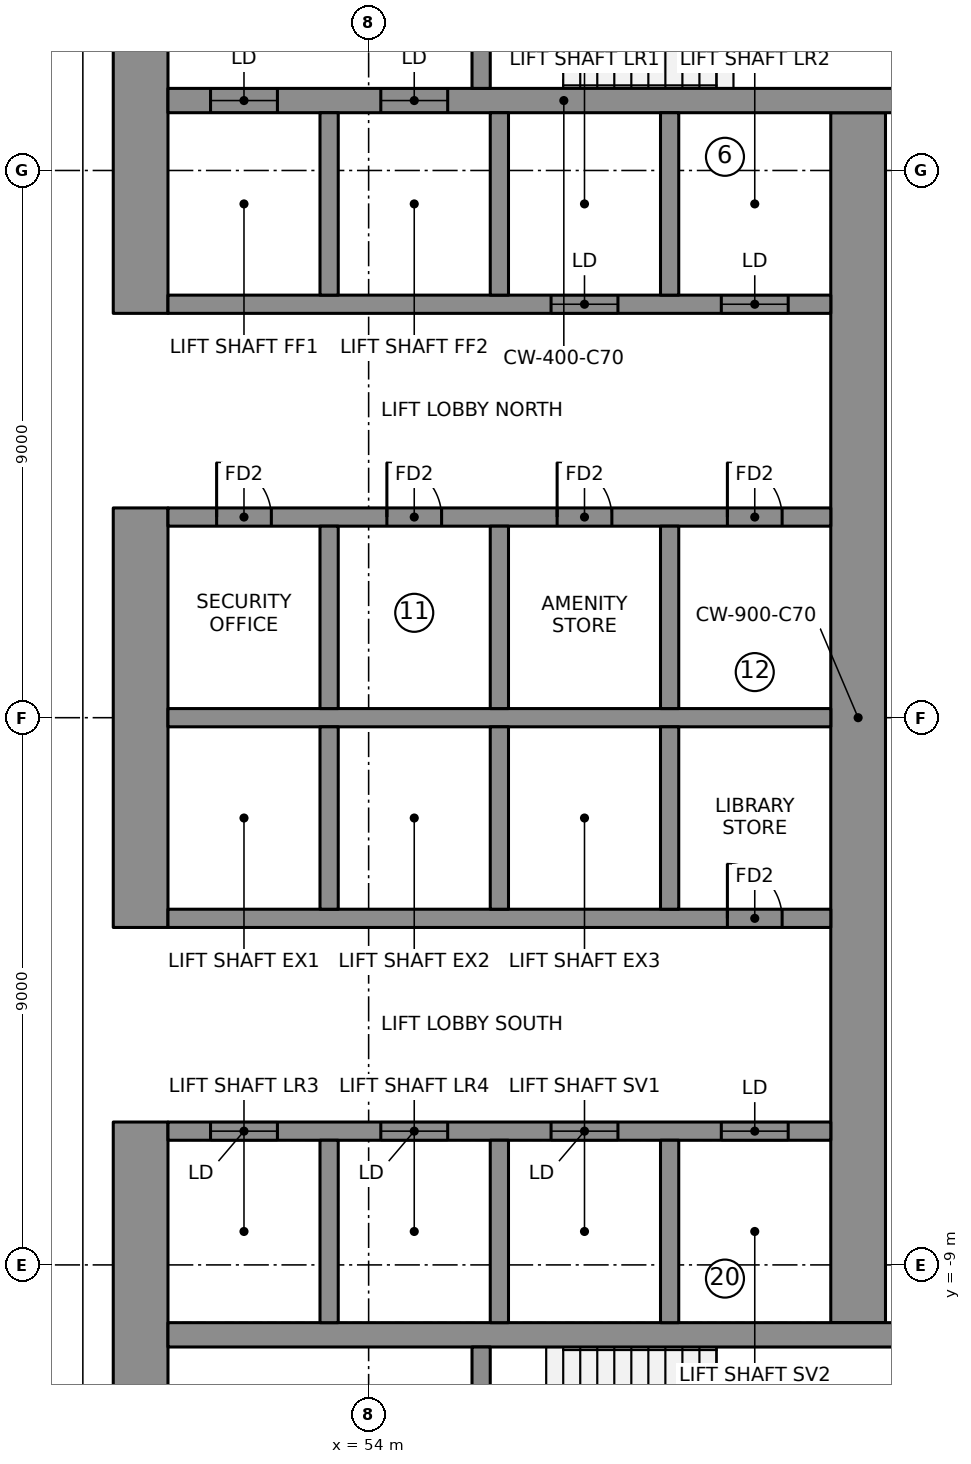
"""IFC4 building model, lengths in metres.
Left out: names, types, materials, properties, quantities, classifications, styles, units other than length and angle.
Written with IfcOpenShell. Run it as: python <this file> out.ifc"""

import sys

from ifc_helpers import new_model, si_unit, direction, frame, frame_2d, origin, place, context, subcontext, project, spatial, rectangle, extrude, element, fill, save


model = new_model("IFC4")
c1 = context("Model", 3, precision=1e-05, world=origin(), true_north=direction((0.0, 1.0)))
c2 = subcontext(c1, "Body", "Model", "MODEL_VIEW")
j1 = project(units=[si_unit("LENGTHUNIT", "METRE"), si_unit("PLANEANGLEUNIT", "RADIAN")], contexts=[c1])
p1 = place(None, origin())
s1 = spatial("IfcSite", under=j1, at=p1, CompositionType="ELEMENT")
p2 = place(p1, origin())
s2 = spatial("IfcBuilding", under=s1, at=p2, CompositionType="ELEMENT")
p3 = place(p2, frame((0.0, 0.0, 144.4)))
s3 = spatial("IfcBuildingStorey", under=s2, at=p3, CompositionType="ELEMENT", Elevation=144.4)
p4 = place(p3, frame((50.25, 6.65, 0.0), z_axis=(0.0, 0.0, 1.0), x_axis=(0.0, 1.0, 0.0)))
e1 = element("IfcWall", 1, at=p4, inside=s3, PredefinedType="SHEAR", context=c2, shape_type="SweptSolid", body=[
    extrude(rectangle(XDim=10.0, YDim=0.9, at=frame_2d((5.0, 0.0))), origin(), (0.0, 0.0, 1.0), 3.55),
])
p5 = place(p4, frame((6.5, 0.0, 0.0)))
e2 = element("IfcOpeningElement", 2, at=p5, cuts=e1, PredefinedType="OPENING", context=c2, shape_type="SweptSolid", body=[
    extrude(rectangle(XDim=1.1, YDim=2.1, at=frame_2d((0.55, 1.05))), frame((0.0, 0.46, 0.0), z_axis=(0.0, -1.0, 0.0), x_axis=(1.0, 0.0, 0.0)), (0.0, 0.0, 1.0), 0.92),
])
p6 = place(p3, frame((50.25, -3.45, 0.0), z_axis=(0.0, 0.0, 1.0), x_axis=(0.0, 1.0, 0.0)))
e3 = element("IfcWall", 3, at=p6, inside=s3, PredefinedType="SHEAR", context=c2, shape_type="SweptSolid", body=[
    extrude(rectangle(XDim=6.9, YDim=0.9, at=frame_2d((3.45, 0.0))), origin(), (0.0, 0.0, 1.0), 3.55),
])
p7 = place(p3, frame((50.25, -16.65, 0.0), z_axis=(0.0, 0.0, 1.0), x_axis=(0.0, 1.0, 0.0)))
e4 = element("IfcWall", 4, at=p7, inside=s3, PredefinedType="SHEAR", context=c2, shape_type="SweptSolid", body=[
    extrude(rectangle(XDim=10.0, YDim=0.9, at=frame_2d((5.0, 0.0))), origin(), (0.0, 0.0, 1.0), 3.55),
])
p8 = place(p7, frame((2.4, 0.0, 0.0)))
e5 = element("IfcOpeningElement", 5, at=p8, cuts=e4, PredefinedType="OPENING", context=c2, shape_type="SweptSolid", body=[
    extrude(rectangle(XDim=1.1, YDim=2.1, at=frame_2d((0.55, 1.05))), frame((0.0, 0.46, 0.0), z_axis=(0.0, -1.0, 0.0), x_axis=(1.0, 0.0, 0.0)), (0.0, 0.0, 1.0), 0.92),
])
p9 = place(p3, frame((62.05, -9.95, 0.0), z_axis=(0.0, 0.0, 1.0), x_axis=(0.0, 1.0, 0.0)))
e6 = element("IfcWall", 6, at=p9, inside=s3, PredefinedType="SHEAR", context=c2, shape_type="SweptSolid", body=[
    extrude(rectangle(XDim=19.9, YDim=0.9, at=frame_2d((9.95, 0.0))), origin(), (0.0, 0.0, 1.0), 3.55),
])
p10 = place(p3, frame((50.7, 10.15, 0.0), z_axis=(0.0, 0.0, 1.0), x_axis=(1.0, 0.0, 0.0)))
e7 = element("IfcWall", 7, at=p10, inside=s3, PredefinedType="SHEAR", context=c2, shape_type="SweptSolid", body=[
    extrude(rectangle(XDim=13.02, YDim=0.4, at=frame_2d((6.51, 0.0))), origin(), (0.0, 0.0, 1.0), 3.55),
])
p11 = place(p10, frame((0.7, 0.0, 0.0)))
e8 = element("IfcOpeningElement", 8, at=p11, cuts=e7, PredefinedType="OPENING", context=c2, shape_type="SweptSolid", body=[
    extrude(rectangle(XDim=1.1, YDim=2.1, at=frame_2d((0.55, 1.05))), frame((0.0, 0.21, 0.0), z_axis=(0.0, -1.0, 0.0), x_axis=(1.0, 0.0, 0.0)), (0.0, 0.0, 1.0), 0.42),
])
p12 = place(p10, frame((3.5, 0.0, 0.0)))
e9 = element("IfcOpeningElement", 9, at=p12, cuts=e7, PredefinedType="OPENING", context=c2, shape_type="SweptSolid", body=[
    extrude(rectangle(XDim=1.1, YDim=2.1, at=frame_2d((0.55, 1.05))), frame((0.0, 0.21, 0.0), z_axis=(0.0, -1.0, 0.0), x_axis=(1.0, 0.0, 0.0)), (0.0, 0.0, 1.0), 0.42),
])
p13 = place(p3, frame((50.7, -10.15, 0.0), z_axis=(0.0, 0.0, 1.0), x_axis=(1.0, 0.0, 0.0)))
e10 = element("IfcWall", 10, at=p13, inside=s3, PredefinedType="SHEAR", context=c2, shape_type="SweptSolid", body=[
    extrude(rectangle(XDim=13.02, YDim=0.4, at=frame_2d((6.51, 0.0))), origin(), (0.0, 0.0, 1.0), 3.55),
])
p14 = place(p3, frame((50.7, 0.0, 0.0), z_axis=(0.0, 0.0, 1.0), x_axis=(1.0, 0.0, 0.0)))
e11 = element("IfcWall", 11, at=p14, inside=s3, PredefinedType="SHEAR", context=c2, shape_type="SweptSolid", body=[
    extrude(rectangle(XDim=10.9, YDim=0.3, at=frame_2d((5.45, 0.0))), origin(), (0.0, 0.0, 1.0), 3.55),
])
p15 = place(p3, frame((50.7, 3.3, 0.0), z_axis=(0.0, 0.0, 1.0), x_axis=(1.0, 0.0, 0.0)))
e12 = element("IfcWall", 12, at=p15, inside=s3, PredefinedType="SHEAR", context=c2, shape_type="SweptSolid", body=[
    extrude(rectangle(XDim=10.9, YDim=0.3, at=frame_2d((5.45, 0.0))), origin(), (0.0, 0.0, 1.0), 3.55),
])
p16 = place(p15, frame((0.8, 0.0, 0.0)))
e13 = element("IfcOpeningElement", 13, at=p16, cuts=e12, PredefinedType="OPENING", context=c2, shape_type="SweptSolid", body=[
    extrude(rectangle(XDim=0.9, YDim=2.1, at=frame_2d((0.45, 1.05))), frame((0.0, 0.16, 0.0), z_axis=(0.0, -1.0, 0.0), x_axis=(1.0, 0.0, 0.0)), (0.0, 0.0, 1.0), 0.32),
])
p17 = place(p15, frame((3.6, 0.0, 0.0)))
e14 = element("IfcOpeningElement", 14, at=p17, cuts=e12, PredefinedType="OPENING", context=c2, shape_type="SweptSolid", body=[
    extrude(rectangle(XDim=0.9, YDim=2.1, at=frame_2d((0.45, 1.05))), frame((0.0, 0.16, 0.0), z_axis=(0.0, -1.0, 0.0), x_axis=(1.0, 0.0, 0.0)), (0.0, 0.0, 1.0), 0.32),
])
p18 = place(p15, frame((6.4, 0.0, 0.0)))
e15 = element("IfcOpeningElement", 15, at=p18, cuts=e12, PredefinedType="OPENING", context=c2, shape_type="SweptSolid", body=[
    extrude(rectangle(XDim=0.9, YDim=2.1, at=frame_2d((0.45, 1.05))), frame((0.0, 0.16, 0.0), z_axis=(0.0, -1.0, 0.0), x_axis=(1.0, 0.0, 0.0)), (0.0, 0.0, 1.0), 0.32),
])
p19 = place(p15, frame((9.2, 0.0, 0.0)))
e16 = element("IfcOpeningElement", 16, at=p19, cuts=e12, PredefinedType="OPENING", context=c2, shape_type="SweptSolid", body=[
    extrude(rectangle(XDim=0.9, YDim=2.1, at=frame_2d((0.45, 1.05))), frame((0.0, 0.16, 0.0), z_axis=(0.0, -1.0, 0.0), x_axis=(1.0, 0.0, 0.0)), (0.0, 0.0, 1.0), 0.32),
])
p20 = place(p3, frame((50.7, 6.8, 0.0), z_axis=(0.0, 0.0, 1.0), x_axis=(1.0, 0.0, 0.0)))
e17 = element("IfcWall", 17, at=p20, inside=s3, PredefinedType="SHEAR", context=c2, shape_type="SweptSolid", body=[
    extrude(rectangle(XDim=10.9, YDim=0.3, at=frame_2d((5.45, 0.0))), origin(), (0.0, 0.0, 1.0), 3.55),
])
p21 = place(p20, frame((6.3, 0.0, 0.0)))
e18 = element("IfcOpeningElement", 18, at=p21, cuts=e17, PredefinedType="OPENING", context=c2, shape_type="SweptSolid", body=[
    extrude(rectangle(XDim=1.1, YDim=2.1, at=frame_2d((0.55, 1.05))), frame((0.0, 0.16, 0.0), z_axis=(0.0, -1.0, 0.0), x_axis=(1.0, 0.0, 0.0)), (0.0, 0.0, 1.0), 0.32),
])
p22 = place(p20, frame((9.1, 0.0, 0.0)))
e19 = element("IfcOpeningElement", 19, at=p22, cuts=e17, PredefinedType="OPENING", context=c2, shape_type="SweptSolid", body=[
    extrude(rectangle(XDim=1.1, YDim=2.1, at=frame_2d((0.55, 1.05))), frame((0.0, 0.16, 0.0), z_axis=(0.0, -1.0, 0.0), x_axis=(1.0, 0.0, 0.0)), (0.0, 0.0, 1.0), 0.32),
])
for number, where, z_axis, x_axis in (
    (20, (53.35, 0.15, 0.0), (0.0, 0.0, 1.0), (0.0, 1.0, 0.0)),
    (21, (53.35, 6.95, 0.0), (0.0, 0.0, 1.0), (0.0, 1.0, 0.0)),
    (22, (56.15, 0.15, 0.0), (0.0, 0.0, 1.0), (0.0, 1.0, 0.0)),
    (23, (56.15, 6.95, 0.0), (0.0, 0.0, 1.0), (0.0, 1.0, 0.0)),
    (24, (58.95, 0.15, 0.0), (0.0, 0.0, 1.0), (0.0, 1.0, 0.0)),
    (25, (58.95, 6.95, 0.0), (0.0, 0.0, 1.0), (0.0, 1.0, 0.0)),
):
    element("IfcWall", number, at=place(p3, frame(where, z_axis=z_axis, x_axis=x_axis)), inside=s3, PredefinedType="SHEAR", context=c2, shape_type="SweptSolid", body=[
        extrude(rectangle(XDim=3.0, YDim=0.3, at=frame_2d((1.5, 0.0))), origin(), (0.0, 0.0, 1.0), 3.55),
    ])
p23 = place(p3, frame((50.7, -3.3, 0.0), z_axis=(0.0, 0.0, 1.0), x_axis=(1.0, 0.0, 0.0)))
e26 = element("IfcWall", 26, at=p23, inside=s3, PredefinedType="SHEAR", context=c2, shape_type="SweptSolid", body=[
    extrude(rectangle(XDim=10.9, YDim=0.3, at=frame_2d((5.45, 0.0))), origin(), (0.0, 0.0, 1.0), 3.55),
])
p24 = place(p23, frame((9.2, 0.0, 0.0)))
e27 = element("IfcOpeningElement", 27, at=p24, cuts=e26, PredefinedType="OPENING", context=c2, shape_type="SweptSolid", body=[
    extrude(rectangle(XDim=0.9, YDim=2.1, at=frame_2d((0.45, 1.05))), frame((0.0, 0.16, 0.0), z_axis=(0.0, -1.0, 0.0), x_axis=(1.0, 0.0, 0.0)), (0.0, 0.0, 1.0), 0.32),
])
p25 = place(p3, frame((50.7, -6.8, 0.0), z_axis=(0.0, 0.0, 1.0), x_axis=(1.0, 0.0, 0.0)))
e28 = element("IfcWall", 28, at=p25, inside=s3, PredefinedType="SHEAR", context=c2, shape_type="SweptSolid", body=[
    extrude(rectangle(XDim=10.9, YDim=0.3, at=frame_2d((5.45, 0.0))), origin(), (0.0, 0.0, 1.0), 3.55),
])
p26 = place(p25, frame((0.7, 0.0, 0.0)))
e29 = element("IfcOpeningElement", 29, at=p26, cuts=e28, PredefinedType="OPENING", context=c2, shape_type="SweptSolid", body=[
    extrude(rectangle(XDim=1.1, YDim=2.1, at=frame_2d((0.55, 1.05))), frame((0.0, 0.16, 0.0), z_axis=(0.0, -1.0, 0.0), x_axis=(1.0, 0.0, 0.0)), (0.0, 0.0, 1.0), 0.32),
])
p27 = place(p25, frame((3.5, 0.0, 0.0)))
e30 = element("IfcOpeningElement", 30, at=p27, cuts=e28, PredefinedType="OPENING", context=c2, shape_type="SweptSolid", body=[
    extrude(rectangle(XDim=1.1, YDim=2.1, at=frame_2d((0.55, 1.05))), frame((0.0, 0.16, 0.0), z_axis=(0.0, -1.0, 0.0), x_axis=(1.0, 0.0, 0.0)), (0.0, 0.0, 1.0), 0.32),
])
p28 = place(p25, frame((6.3, 0.0, 0.0)))
e31 = element("IfcOpeningElement", 31, at=p28, cuts=e28, PredefinedType="OPENING", context=c2, shape_type="SweptSolid", body=[
    extrude(rectangle(XDim=1.1, YDim=2.1, at=frame_2d((0.55, 1.05))), frame((0.0, 0.16, 0.0), z_axis=(0.0, -1.0, 0.0), x_axis=(1.0, 0.0, 0.0)), (0.0, 0.0, 1.0), 0.32),
])
p29 = place(p25, frame((9.1, 0.0, 0.0)))
e32 = element("IfcOpeningElement", 32, at=p29, cuts=e28, PredefinedType="OPENING", context=c2, shape_type="SweptSolid", body=[
    extrude(rectangle(XDim=1.1, YDim=2.1, at=frame_2d((0.55, 1.05))), frame((0.0, 0.16, 0.0), z_axis=(0.0, -1.0, 0.0), x_axis=(1.0, 0.0, 0.0)), (0.0, 0.0, 1.0), 0.32),
])
for number, where, z_axis, x_axis in (
    (33, (53.35, -3.15, 0.0), (0.0, 0.0, 1.0), (0.0, 1.0, 0.0)),
    (34, (53.35, -9.95, 0.0), (0.0, 0.0, 1.0), (0.0, 1.0, 0.0)),
    (35, (56.15, -3.15, 0.0), (0.0, 0.0, 1.0), (0.0, 1.0, 0.0)),
    (36, (56.15, -9.95, 0.0), (0.0, 0.0, 1.0), (0.0, 1.0, 0.0)),
    (37, (58.95, -3.15, 0.0), (0.0, 0.0, 1.0), (0.0, 1.0, 0.0)),
    (38, (58.95, -9.95, 0.0), (0.0, 0.0, 1.0), (0.0, 1.0, 0.0)),
):
    element("IfcWall", number, at=place(p3, frame(where, z_axis=z_axis, x_axis=x_axis)), inside=s3, PredefinedType="SHEAR", context=c2, shape_type="SweptSolid", body=[
        extrude(rectangle(XDim=3.0, YDim=0.3, at=frame_2d((1.5, 0.0))), origin(), (0.0, 0.0, 1.0), 3.55),
    ])
p30 = place(p3, frame((55.85, 10.35, 0.0), z_axis=(0.0, 0.0, 1.0), x_axis=(0.0, 1.0, 0.0)))
e39 = element("IfcWall", 39, at=p30, inside=s3, PredefinedType="SHEAR", context=c2, shape_type="SweptSolid", body=[
    extrude(rectangle(XDim=5.4, YDim=0.3, at=frame_2d((2.7, 0.0))), origin(), (0.0, 0.0, 1.0), 3.55),
])
p31 = place(p30, frame((1.43, 0.0, 0.0)))
e40 = element("IfcOpeningElement", 40, at=p31, cuts=e39, PredefinedType="OPENING", context=c2, shape_type="SweptSolid", body=[
    extrude(rectangle(XDim=1.1, YDim=2.1, at=frame_2d((0.55, 1.05))), frame((0.0, 0.16, 0.0), z_axis=(0.0, -1.0, 0.0), x_axis=(1.0, 0.0, 0.0)), (0.0, 0.0, 1.0), 0.32),
])
p32 = place(p30, frame((3.6, 0.0, 0.0)))
e41 = element("IfcOpeningElement", 41, at=p32, cuts=e39, PredefinedType="OPENING", context=c2, shape_type="SweptSolid", body=[
    extrude(rectangle(XDim=1.1, YDim=2.1, at=frame_2d((0.55, 1.05))), frame((0.0, 0.16, 0.0), z_axis=(0.0, -1.0, 0.0), x_axis=(1.0, 0.0, 0.0)), (0.0, 0.0, 1.0), 0.32),
])
p33 = place(p3, frame((55.85, -15.75, 0.0), z_axis=(0.0, 0.0, 1.0), x_axis=(0.0, 1.0, 0.0)))
e42 = element("IfcWall", 42, at=p33, inside=s3, PredefinedType="SHEAR", context=c2, shape_type="SweptSolid", body=[
    extrude(rectangle(XDim=5.4, YDim=0.3, at=frame_2d((2.7, 0.0))), origin(), (0.0, 0.0, 1.0), 3.55),
])
p34 = place(p33, frame((3.6, 0.0, 0.0)))
e43 = element("IfcOpeningElement", 43, at=p34, cuts=e42, PredefinedType="OPENING", context=c2, shape_type="SweptSolid", body=[
    extrude(rectangle(XDim=1.1, YDim=2.1, at=frame_2d((0.55, 1.05))), frame((0.0, 0.16, 0.0), z_axis=(0.0, -1.0, 0.0), x_axis=(1.0, 0.0, 0.0)), (0.0, 0.0, 1.0), 0.32),
])
p35 = place(p33, frame((0.8, 0.0, 0.0)))
e44 = element("IfcOpeningElement", 44, at=p35, cuts=e42, PredefinedType="OPENING", context=c2, shape_type="SweptSolid", body=[
    extrude(rectangle(XDim=0.9, YDim=2.1, at=frame_2d((0.45, 1.05))), frame((0.0, 0.16, 0.0), z_axis=(0.0, -1.0, 0.0), x_axis=(1.0, 0.0, 0.0)), (0.0, 0.0, 1.0), 0.32),
])
p36 = place(p11, origin())
e45 = element("IfcDoor", 45, at=p36, inside=s3, OperationType="DOUBLE_DOOR_SLIDING", PredefinedType="DOOR", context=c2, shape_type="SweptSolid", body=[
    extrude(rectangle(XDim=1.1, YDim=2.1, at=frame_2d((0.55, 1.05))), frame((0.0, 0.025, 0.0), z_axis=(0.0, -1.0, 0.0), x_axis=(1.0, 0.0, 0.0)), (0.0, 0.0, 1.0), 0.05),
])
fill(e8, e45)
p37 = place(p12, origin())
e46 = element("IfcDoor", 46, at=p37, inside=s3, OperationType="DOUBLE_DOOR_SLIDING", PredefinedType="DOOR", context=c2, shape_type="SweptSolid", body=[
    extrude(rectangle(XDim=1.1, YDim=2.1, at=frame_2d((0.55, 1.05))), frame((0.0, 0.025, 0.0), z_axis=(0.0, -1.0, 0.0), x_axis=(1.0, 0.0, 0.0)), (0.0, 0.0, 1.0), 0.05),
])
fill(e9, e46)
p38 = place(p21, origin())
e47 = element("IfcDoor", 47, at=p38, inside=s3, OperationType="DOUBLE_DOOR_SLIDING", PredefinedType="DOOR", context=c2, shape_type="SweptSolid", body=[
    extrude(rectangle(XDim=1.1, YDim=2.1, at=frame_2d((0.55, 1.05))), frame((0.0, 0.025, 0.0), z_axis=(0.0, -1.0, 0.0), x_axis=(1.0, 0.0, 0.0)), (0.0, 0.0, 1.0), 0.05),
])
fill(e18, e47)
p39 = place(p22, origin())
e48 = element("IfcDoor", 48, at=p39, inside=s3, OperationType="DOUBLE_DOOR_SLIDING", PredefinedType="DOOR", context=c2, shape_type="SweptSolid", body=[
    extrude(rectangle(XDim=1.1, YDim=2.1, at=frame_2d((0.55, 1.05))), frame((0.0, 0.025, 0.0), z_axis=(0.0, -1.0, 0.0), x_axis=(1.0, 0.0, 0.0)), (0.0, 0.0, 1.0), 0.05),
])
fill(e19, e48)
p40 = place(p26, origin())
e49 = element("IfcDoor", 49, at=p40, inside=s3, OperationType="DOUBLE_DOOR_SLIDING", PredefinedType="DOOR", context=c2, shape_type="SweptSolid", body=[
    extrude(rectangle(XDim=1.1, YDim=2.1, at=frame_2d((0.55, 1.05))), frame((0.0, 0.025, 0.0), z_axis=(0.0, -1.0, 0.0), x_axis=(1.0, 0.0, 0.0)), (0.0, 0.0, 1.0), 0.05),
])
fill(e29, e49)
p41 = place(p27, origin())
e50 = element("IfcDoor", 50, at=p41, inside=s3, OperationType="DOUBLE_DOOR_SLIDING", PredefinedType="DOOR", context=c2, shape_type="SweptSolid", body=[
    extrude(rectangle(XDim=1.1, YDim=2.1, at=frame_2d((0.55, 1.05))), frame((0.0, 0.025, 0.0), z_axis=(0.0, -1.0, 0.0), x_axis=(1.0, 0.0, 0.0)), (0.0, 0.0, 1.0), 0.05),
])
fill(e30, e50)
p42 = place(p28, origin())
e51 = element("IfcDoor", 51, at=p42, inside=s3, OperationType="DOUBLE_DOOR_SLIDING", PredefinedType="DOOR", context=c2, shape_type="SweptSolid", body=[
    extrude(rectangle(XDim=1.1, YDim=2.1, at=frame_2d((0.55, 1.05))), frame((0.0, 0.025, 0.0), z_axis=(0.0, -1.0, 0.0), x_axis=(1.0, 0.0, 0.0)), (0.0, 0.0, 1.0), 0.05),
])
fill(e31, e51)
p43 = place(p29, origin())
e52 = element("IfcDoor", 52, at=p43, inside=s3, OperationType="DOUBLE_DOOR_SLIDING", PredefinedType="DOOR", context=c2, shape_type="SweptSolid", body=[
    extrude(rectangle(XDim=1.1, YDim=2.1, at=frame_2d((0.55, 1.05))), frame((0.0, 0.025, 0.0), z_axis=(0.0, -1.0, 0.0), x_axis=(1.0, 0.0, 0.0)), (0.0, 0.0, 1.0), 0.05),
])
fill(e32, e52)
p44 = place(p16, origin())
e53 = element("IfcDoor", 53, at=p44, inside=s3, OperationType="SINGLE_SWING_LEFT", PredefinedType="DOOR", context=c2, shape_type="SweptSolid", body=[
    extrude(rectangle(XDim=0.9, YDim=2.1, at=frame_2d((0.45, 1.05))), frame((0.0, 0.025, 0.0), z_axis=(0.0, -1.0, 0.0), x_axis=(1.0, 0.0, 0.0)), (0.0, 0.0, 1.0), 0.05),
])
fill(e13, e53)
p45 = place(p17, origin())
e54 = element("IfcDoor", 54, at=p45, inside=s3, OperationType="SINGLE_SWING_LEFT", PredefinedType="DOOR", context=c2, shape_type="SweptSolid", body=[
    extrude(rectangle(XDim=0.9, YDim=2.1, at=frame_2d((0.45, 1.05))), frame((0.0, 0.025, 0.0), z_axis=(0.0, -1.0, 0.0), x_axis=(1.0, 0.0, 0.0)), (0.0, 0.0, 1.0), 0.05),
])
fill(e14, e54)
p46 = place(p18, origin())
e55 = element("IfcDoor", 55, at=p46, inside=s3, OperationType="SINGLE_SWING_LEFT", PredefinedType="DOOR", context=c2, shape_type="SweptSolid", body=[
    extrude(rectangle(XDim=0.9, YDim=2.1, at=frame_2d((0.45, 1.05))), frame((0.0, 0.025, 0.0), z_axis=(0.0, -1.0, 0.0), x_axis=(1.0, 0.0, 0.0)), (0.0, 0.0, 1.0), 0.05),
])
fill(e15, e55)
p47 = place(p19, origin())
e56 = element("IfcDoor", 56, at=p47, inside=s3, OperationType="SINGLE_SWING_LEFT", PredefinedType="DOOR", context=c2, shape_type="SweptSolid", body=[
    extrude(rectangle(XDim=0.9, YDim=2.1, at=frame_2d((0.45, 1.05))), frame((0.0, 0.025, 0.0), z_axis=(0.0, -1.0, 0.0), x_axis=(1.0, 0.0, 0.0)), (0.0, 0.0, 1.0), 0.05),
])
fill(e16, e56)
p48 = place(p24, origin())
e57 = element("IfcDoor", 57, at=p48, inside=s3, OperationType="SINGLE_SWING_LEFT", PredefinedType="DOOR", context=c2, shape_type="SweptSolid", body=[
    extrude(rectangle(XDim=0.9, YDim=2.1, at=frame_2d((0.45, 1.05))), frame((0.0, 0.025, 0.0), z_axis=(0.0, -1.0, 0.0), x_axis=(1.0, 0.0, 0.0)), (0.0, 0.0, 1.0), 0.05),
])
fill(e27, e57)
save(model, sys.argv[1])
